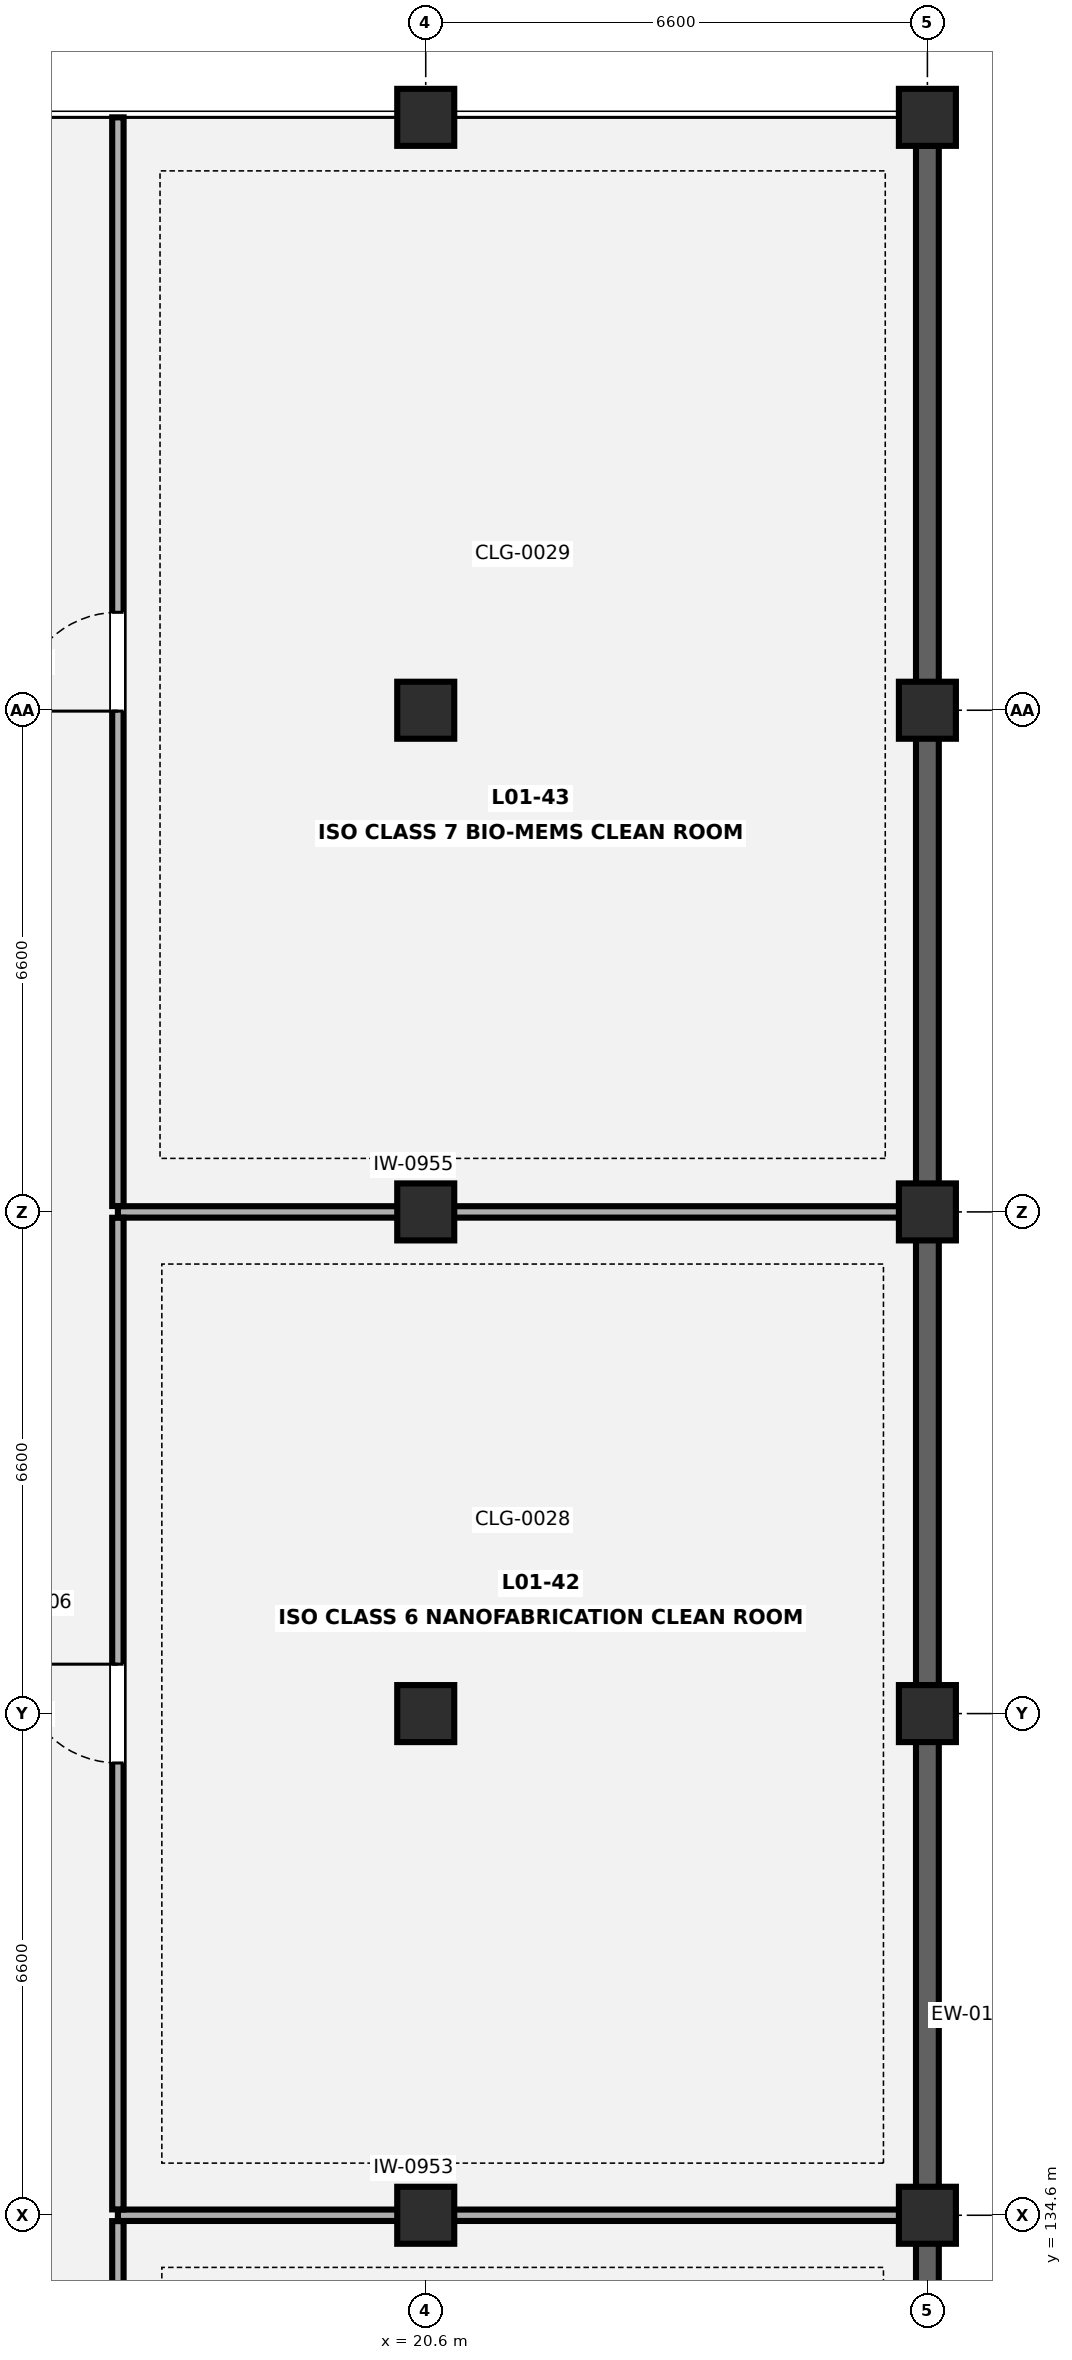
"""IFC4 building model, lengths in metres.
Left out: names, types, materials, properties, quantities, classifications, styles, units other than length and angle.
Written with IfcOpenShell. Run it as: python <this file> out.ifc"""

import sys

from ifc_helpers import new_model, si_unit, direction, frame, frame_2d, origin, origin_2d, place, context, subcontext, project, spatial, rectangle, extrude, element, fill, save


model = new_model("IFC4")
c1 = context("Model", 3, precision=1e-05, world=origin(), true_north=direction((0.0, 1.0)))
c2 = subcontext(c1, "Body", "Model", "MODEL_VIEW")
j1 = project(units=[si_unit("LENGTHUNIT", "METRE"), si_unit("PLANEANGLEUNIT", "RADIAN")], contexts=[c1])
p1 = place(None, origin())
s1 = spatial("IfcSite", under=j1, at=p1, CompositionType="ELEMENT")
p2 = place(p1, origin())
s2 = spatial("IfcBuilding", under=s1, at=p2, CompositionType="ELEMENT")
p3 = place(p2, frame((0.0, 0.0, 4.9)))
s3 = spatial("IfcBuildingStorey", under=s2, at=p3, CompositionType="ELEMENT", Elevation=4.9)
for number, where, z_axis, x_axis in (
    (1, (20.6, 134.6, 0.0), (0.0, 0.0, 1.0), (1.0, 0.0, 0.0)),
    (2, (20.6, 141.2, 0.0), (0.0, 0.0, 1.0), (1.0, 0.0, 0.0)),
    (3, (20.6, 147.8, 0.0), (0.0, 0.0, 1.0), (1.0, 0.0, 0.0)),
    (4, (20.6, 154.4, 0.0), (0.0, 0.0, 1.0), (1.0, 0.0, 0.0)),
    (5, (20.6, 162.2, 0.0), (0.0, 0.0, 1.0), (1.0, 0.0, 0.0)),
    (6, (27.2, 134.6, 0.0), (0.0, 0.0, 1.0), (1.0, 0.0, 0.0)),
    (7, (27.2, 141.2, 0.0), (0.0, 0.0, 1.0), (1.0, 0.0, 0.0)),
    (8, (27.2, 147.8, 0.0), (0.0, 0.0, 1.0), (1.0, 0.0, 0.0)),
    (9, (27.2, 154.4, 0.0), (0.0, 0.0, 1.0), (1.0, 0.0, 0.0)),
    (10, (27.2, 162.2, 0.0), (0.0, 0.0, 1.0), (1.0, 0.0, 0.0)),
):
    element("IfcColumn", number, at=place(p3, frame(where, z_axis=z_axis, x_axis=x_axis)), inside=s3, PredefinedType="COLUMN", context=c2, shape_type="SweptSolid", body=[
        extrude(rectangle(XDim=0.75, YDim=0.75, at=origin_2d()), origin(), (0.0, 0.0, 1.0), 4.2),
    ])
p4 = place(p3, frame((27.2, 161.827, 0.0), z_axis=(0.0, 0.0, 1.0), x_axis=(0.0, -1.0, 0.0)))
e11 = element("IfcWall", 11, at=p4, inside=s3, PredefinedType="SOLIDWALL", context=c2, shape_type="SweptSolid", body=[
    extrude(rectangle(XDim=66.454, YDim=0.3, at=frame_2d((33.227, 0.0))), origin(), (0.0, 0.0, 1.0), 3.84),
])
p5 = place(p3, frame((16.55, 134.6, 0.0), z_axis=(0.0, 0.0, 1.0), x_axis=(1.0, 0.0, 0.0)))
e12 = element("IfcWall", 12, at=p5, inside=s3, PredefinedType="PARTITIONING", context=c2, shape_type="SweptSolid", body=[
    extrude(rectangle(XDim=10.508, YDim=0.15, at=frame_2d((5.254, 0.0))), origin(), (0.0, 0.0, 1.0), 2.435),
])
p6 = place(p3, frame((16.55, 121.477, 0.0), z_axis=(0.0, 0.0, 1.0), x_axis=(0.0, 1.0, 0.0)))
e13 = element("IfcWall", 13, at=p6, inside=s3, PredefinedType="PARTITIONING", context=c2, shape_type="SweptSolid", body=[
    extrude(rectangle(XDim=13.046, YDim=0.15, at=frame_2d((6.523, 0.0))), origin(), (0.0, 0.0, 1.0), 3.85),
])
p7 = place(p6, frame((5.873, 0.0, 0.0)))
e14 = element("IfcOpeningElement", 14, at=p7, cuts=e13, PredefinedType="OPENING", context=c2, shape_type="SweptSolid", body=[
    extrude(rectangle(XDim=1.3, YDim=2.2, at=frame_2d((0.65, 1.1))), frame((0.0, 0.085, 0.0), z_axis=(0.0, -1.0, 0.0), x_axis=(1.0, 0.0, 0.0)), (0.0, 0.0, 1.0), 0.17),
])
p8 = place(p3, frame((16.55, 147.8, 0.0), z_axis=(0.0, 0.0, 1.0), x_axis=(1.0, 0.0, 0.0)))
e15 = element("IfcWall", 15, at=p8, inside=s3, PredefinedType="PARTITIONING", context=c2, shape_type="SweptSolid", body=[
    extrude(rectangle(XDim=10.508, YDim=0.15, at=frame_2d((5.254, 0.0))), origin(), (0.0, 0.0, 1.0), 2.435),
])
p9 = place(p3, frame((16.55, 134.677, 0.0), z_axis=(0.0, 0.0, 1.0), x_axis=(0.0, 1.0, 0.0)))
e16 = element("IfcWall", 16, at=p9, inside=s3, PredefinedType="PARTITIONING", context=c2, shape_type="SweptSolid", body=[
    extrude(rectangle(XDim=13.046, YDim=0.15, at=frame_2d((6.523, 0.0))), origin(), (0.0, 0.0, 1.0), 3.85),
])
p10 = place(p9, frame((5.873, 0.0, 0.0)))
e17 = element("IfcOpeningElement", 17, at=p10, cuts=e16, PredefinedType="OPENING", context=c2, shape_type="SweptSolid", body=[
    extrude(rectangle(XDim=1.3, YDim=2.2, at=frame_2d((0.65, 1.1))), frame((0.0, 0.085, 0.0), z_axis=(0.0, -1.0, 0.0), x_axis=(1.0, 0.0, 0.0)), (0.0, 0.0, 1.0), 0.17),
])
p11 = place(p3, frame((16.55, 147.877, 0.0), z_axis=(0.0, 0.0, 1.0), x_axis=(0.0, 1.0, 0.0)))
e18 = element("IfcWall", 18, at=p11, inside=s3, PredefinedType="PARTITIONING", context=c2, shape_type="SweptSolid", body=[
    extrude(rectangle(XDim=14.323, YDim=0.15, at=frame_2d((7.162, 0.0))), origin(), (0.0, 0.0, 1.0), 3.85),
])
p12 = place(p11, frame((6.511, 0.0, 0.0)))
e19 = element("IfcOpeningElement", 19, at=p12, cuts=e18, PredefinedType="OPENING", context=c2, shape_type="SweptSolid", body=[
    extrude(rectangle(XDim=1.3, YDim=2.2, at=frame_2d((0.65, 1.1))), frame((0.0, 0.085, 0.0), z_axis=(0.0, -1.0, 0.0), x_axis=(1.0, 0.0, 0.0)), (0.0, 0.0, 1.0), 0.17),
])
p13 = place(p10, origin())
e20 = element("IfcDoor", 20, at=p13, inside=s3, OperationType="SINGLE_SWING_RIGHT", PredefinedType="DOOR", context=c2, shape_type="SweptSolid", body=[
    extrude(rectangle(XDim=1.3, YDim=2.2, at=frame_2d((0.65, 1.1))), frame((0.0, 0.025, 0.0), z_axis=(0.0, -1.0, 0.0), x_axis=(1.0, 0.0, 0.0)), (0.0, 0.0, 1.0), 0.05),
])
fill(e17, e20)
p14 = place(p12, origin())
e21 = element("IfcDoor", 21, at=p14, inside=s3, OperationType="SINGLE_SWING_LEFT", PredefinedType="DOOR", context=c2, shape_type="SweptSolid", body=[
    extrude(rectangle(XDim=1.3, YDim=2.2, at=frame_2d((0.65, 1.1))), frame((0.0, 0.025, 0.0), z_axis=(0.0, -1.0, 0.0), x_axis=(1.0, 0.0, 0.0)), (0.0, 0.0, 1.0), 0.05),
])
fill(e19, e21)
save(model, sys.argv[1])
